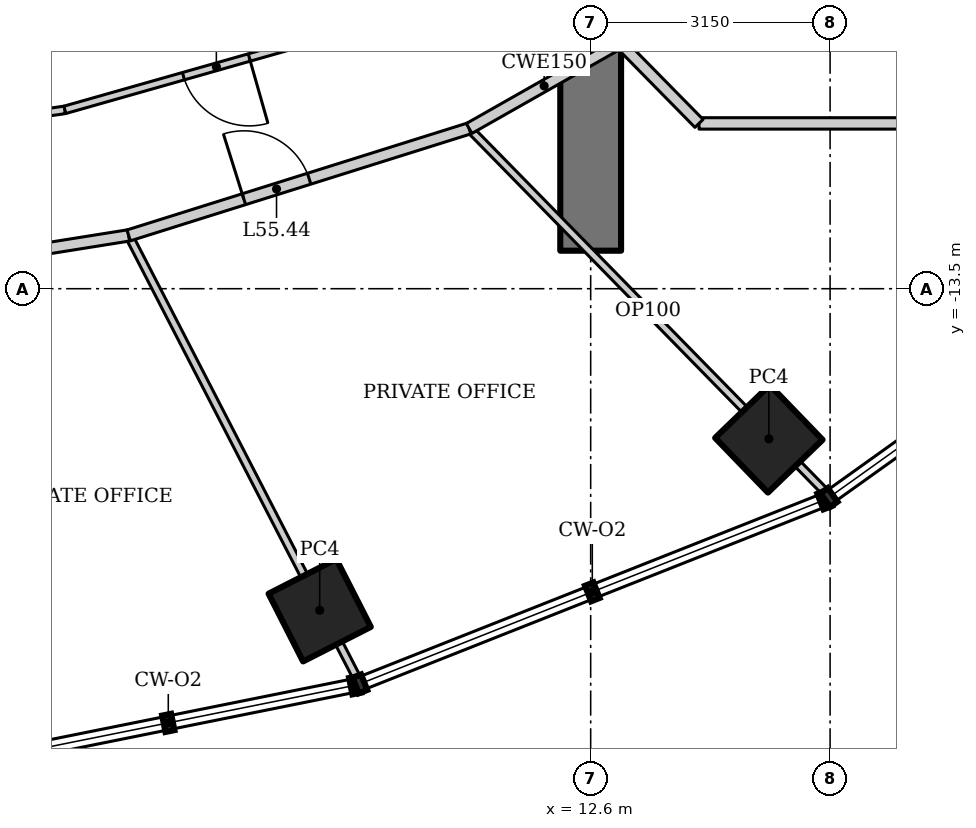
"""IFC4 building model, lengths in metres.
Left out: names, types, materials, properties, quantities, classifications, styles, units other than length and angle.
Written with IfcOpenShell. Run it as: python <this file> out.ifc"""

import sys

from ifc_helpers import new_model, si_unit, direction, frame, frame_2d, origin, origin_2d, place, context, subcontext, project, spatial, rectangle, hollow_rectangle, extrude, element, fill, save


model = new_model("IFC4")
c1 = context("Model", 3, precision=1e-05, world=origin(), true_north=direction((0.0, 1.0)))
c2 = subcontext(c1, "Body", "Model", "MODEL_VIEW")
j1 = project(units=[si_unit("LENGTHUNIT", "METRE"), si_unit("PLANEANGLEUNIT", "RADIAN")], contexts=[c1])
p1 = place(None, origin())
s1 = spatial("IfcSite", under=j1, at=p1, CompositionType="ELEMENT")
p2 = place(p1, origin())
s2 = spatial("IfcBuilding", under=s1, at=p2, CompositionType="ELEMENT")
p3 = place(p2, frame((0.0, 0.0, 236.8)))
s3 = spatial("IfcBuildingStorey", under=s2, at=p3, CompositionType="ELEMENT", Elevation=236.8)
for number, where, z_axis, x_axis in (
    (1, (9.035, -17.731, 0.0), (0.0, 0.0, 1.0), (0.891, 0.454, 0.0)),
    (2, (14.944, -15.475, 0.0), (0.0, 0.0, 1.0), (0.719, 0.695, 0.0)),
):
    element("IfcColumn", number, at=place(p3, frame(where, z_axis=z_axis, x_axis=x_axis)), inside=s3, PredefinedType="COLUMN", context=c2, shape_type="SweptSolid", body=[
        extrude(hollow_rectangle(XDim=1.0, YDim=1.0, WallThickness=0.08, at=origin_2d()), origin(), (0.0, 0.0, 1.0), 4.2),
    ])
p4 = place(p3, frame((12.6, -13.0, 0.0), z_axis=(0.0, 0.0, 1.0), x_axis=(0.0, 1.0, 0.0)))
e3 = element("IfcWall", 3, at=p4, inside=s3, PredefinedType="SHEAR", context=c2, shape_type="SweptSolid", body=[
    extrude(rectangle(XDim=26.0, YDim=0.8, at=frame_2d((13.0, 0.0))), origin(), (0.0, 0.0, 1.0), 4.2),
])
p5 = place(p4, frame((12.1, 0.0, 0.0)))
e4 = element("IfcOpeningElement", 4, at=p5, cuts=e3, PredefinedType="OPENING", context=c2, shape_type="SweptSolid", body=[
    extrude(rectangle(XDim=1.8, YDim=2.1, at=frame_2d((0.9, 1.05))), frame((0.0, 0.41, 0.0), z_axis=(0.0, -1.0, 0.0), x_axis=(1.0, 0.0, 0.0)), (0.0, 0.0, 1.0), 0.82),
])
p6 = place(p3, frame((9.54, -18.65, 0.0), z_axis=(0.0, 0.0, 1.0), x_axis=(-0.458420942987, 0.888735190611, 0.0)))
e5 = element("IfcWall", 5, at=p6, inside=s3, PredefinedType="PARTITIONING", context=c2, shape_type="SweptSolid", body=[
    extrude(rectangle(XDim=6.584, YDim=0.1, at=frame_2d((3.292, 0.0))), origin(), (0.0, 0.0, 1.0), 3.293),
])
p7 = place(p3, frame((15.709, -16.199, 0.0), z_axis=(0.0, 0.0, 1.0), x_axis=(-0.699758297028, 0.71437967898, 0.0)))
e6 = element("IfcWall", 6, at=p7, inside=s3, PredefinedType="PARTITIONING", context=c2, shape_type="SweptSolid", body=[
    extrude(rectangle(XDim=6.729, YDim=0.1, at=frame_2d((3.365, 0.0))), origin(), (0.0, 0.0, 1.0), 3.41),
])
p8 = place(p3, frame((3.081, -13.347, 0.0), z_axis=(0.0, 0.0, 1.0), x_axis=(0.987554093087, 0.157279729233, 0.0)))
e7 = element("IfcWall", 7, at=p8, inside=s3, PredefinedType="PARTITIONING", context=c2, shape_type="SweptSolid", body=[
    extrude(rectangle(XDim=3.483, YDim=0.15, at=frame_2d((1.742, 0.0))), origin(), (0.0, 0.0, 1.0), 4.05),
])
p9 = place(p8, frame((0.15, 0.0, 0.0)))
e8 = element("IfcOpeningElement", 8, at=p9, cuts=e7, PredefinedType="OPENING", context=c2, shape_type="SweptSolid", body=[
    extrude(rectangle(XDim=0.9, YDim=2.1, at=frame_2d((0.45, 1.05))), frame((0.0, 0.085, 0.0), z_axis=(0.0, -1.0, 0.0), x_axis=(1.0, 0.0, 0.0)), (0.0, 0.0, 1.0), 0.17),
])
p10 = place(p3, frame((6.521, -12.799, 0.0), z_axis=(0.0, 0.0, 1.0), x_axis=(0.954031103669, 0.299707612903, 0.0)))
e9 = element("IfcWall", 9, at=p10, inside=s3, PredefinedType="PARTITIONING", context=c2, shape_type="SweptSolid", body=[
    extrude(rectangle(XDim=4.695, YDim=0.15, at=frame_2d((2.348, 0.0))), origin(), (0.0, 0.0, 1.0), 4.05),
])
p11 = place(p10, frame((1.589, 0.0, 0.0)))
e10 = element("IfcOpeningElement", 10, at=p11, cuts=e9, PredefinedType="OPENING", context=c2, shape_type="SweptSolid", body=[
    extrude(rectangle(XDim=0.9, YDim=2.1, at=frame_2d((0.45, 1.05))), frame((0.0, 0.085, 0.0), z_axis=(0.0, -1.0, 0.0), x_axis=(1.0, 0.0, 0.0)), (0.0, 0.0, 1.0), 0.17),
])
p12 = place(p3, frame((9.67, -10.014, 0.0), z_axis=(0.0, 0.0, 1.0), x_axis=(-0.961973498971, -0.273142796496, 0.0)))
e11 = element("IfcWall", 11, at=p12, inside=s3, PredefinedType="PARTITIONING", context=c2, shape_type="SweptSolid", body=[
    extrude(rectangle(XDim=4.148, YDim=0.1, at=frame_2d((2.074, 0.0))), origin(), (0.0, 0.0, 1.0), 4.05),
])
p13 = place(p12, frame((1.624, 0.0, 0.0)))
e12 = element("IfcOpeningElement", 12, at=p13, cuts=e11, PredefinedType="OPENING", context=c2, shape_type="SweptSolid", body=[
    extrude(rectangle(XDim=0.9, YDim=2.1, at=frame_2d((0.45, 1.05))), frame((0.0, 0.06, 0.0), z_axis=(0.0, -1.0, 0.0), x_axis=(1.0, 0.0, 0.0)), (0.0, 0.0, 1.0), 0.12),
])
p14 = place(p3, frame((5.68, -11.147, 0.0), z_axis=(0.0, 0.0, 1.0), x_axis=(-0.989797891768, -0.142478536811, 0.0)))
e13 = element("IfcWall", 13, at=p14, inside=s3, PredefinedType="PARTITIONING", context=c2, shape_type="SweptSolid", body=[
    extrude(rectangle(XDim=0.485, YDim=0.1, at=frame_2d((0.242, 0.0))), origin(), (0.0, 0.0, 1.0), 4.05),
])
p15 = place(p3, frame((11.001, -11.392, 0.0), z_axis=(0.0, 0.0, 1.0), x_axis=(0.869722107117, 0.493541747366, 0.0)))
e14 = element("IfcWall", 14, at=p15, inside=s3, PredefinedType="PARTITIONING", context=c2, shape_type="SweptSolid", body=[
    extrude(rectangle(XDim=2.27, YDim=0.15, at=frame_2d((1.135, 0.0))), origin(), (0.0, 0.0, 1.0), 4.05),
])
p16 = place(p3, frame((17.475, -11.325, 0.0), z_axis=(0.0, 0.0, 1.0), x_axis=(-1.0, 0.0, 0.0)))
e15 = element("IfcWall", 15, at=p16, inside=s3, PredefinedType="PARTITIONING", context=c2, shape_type="SweptSolid", body=[
    extrude(rectangle(XDim=3.449, YDim=0.15, at=frame_2d((1.725, 0.0))), origin(), (0.0, 0.0, 1.0), 4.05),
])
p17 = place(p3, frame((14.025, -11.325, 0.0), z_axis=(0.0, 0.0, 1.0), x_axis=(-0.701113567316, 0.713049623606, 0.0)))
e16 = element("IfcWall", 16, at=p17, inside=s3, PredefinedType="PARTITIONING", context=c2, shape_type="SweptSolid", body=[
    extrude(rectangle(XDim=1.411, YDim=0.15, at=frame_2d((0.706, 0.0))), origin(), (0.0, 0.0, 1.0), 4.05),
])
p18 = place(p13, origin())
e17 = element("IfcDoor", 17, at=p18, inside=s3, OperationType="SINGLE_SWING_LEFT", PredefinedType="DOOR", context=c2, shape_type="SweptSolid", body=[
    extrude(rectangle(XDim=0.9, YDim=2.1, at=frame_2d((0.45, 1.05))), frame((0.0, 0.025, 0.0), z_axis=(0.0, -1.0, 0.0), x_axis=(1.0, 0.0, 0.0)), (0.0, 0.0, 1.0), 0.05),
])
fill(e12, e17)
p19 = place(p11, origin())
e18 = element("IfcDoor", 18, at=p19, inside=s3, OperationType="SINGLE_SWING_LEFT", PredefinedType="DOOR", context=c2, shape_type="SweptSolid", body=[
    extrude(rectangle(XDim=0.9, YDim=2.1, at=frame_2d((0.45, 1.05))), frame((0.0, 0.025, 0.0), z_axis=(0.0, -1.0, 0.0), x_axis=(1.0, 0.0, 0.0)), (0.0, 0.0, 1.0), 0.05),
])
fill(e10, e18)
save(model, sys.argv[1])
